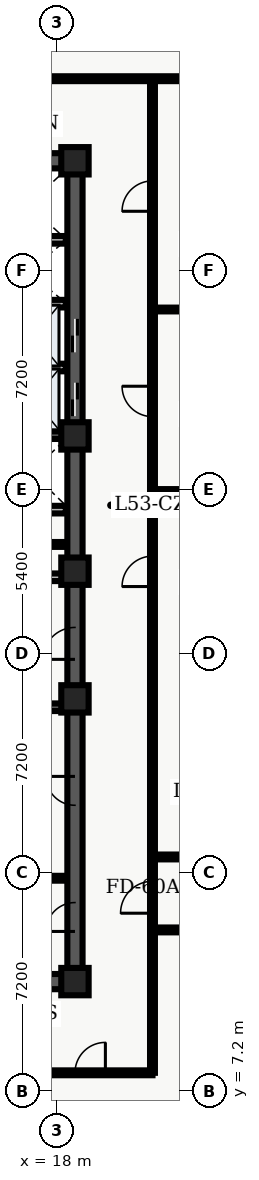
"""IFC4 building model, lengths in metres.
Left out: names, types, materials, properties, quantities, classifications, styles, units other than length and angle.
Written with IfcOpenShell. Run it as: python <this file> out.ifc"""

import sys

from ifc_helpers import new_model, entity, si_unit, converted_unit, direction, frame, origin_with_axes, origin_2d_with_axis, place, context, subcontext, project, spatial, polyline, rectangle, outline, extrude, element, fill, save


model = new_model("IFC4")
c1 = context("Model", 3, precision=1e-05, world=origin_with_axes(), true_north=direction((0.0, 1.0)))
c2 = subcontext(c1, "Body", "Model", "MODEL_VIEW")
j1 = project(units=[si_unit("LENGTHUNIT", "METRE"), converted_unit("PLANEANGLEUNIT", "DEGREE", entity("IfcPlaneAngleMeasure", 0.017), si_unit("PLANEANGLEUNIT", "RADIAN"), dimensions=[0, 0, 0, 0, 0, 0, 0])], contexts=[c1])
p1 = place(None, origin_with_axes())
s1 = spatial("IfcSite", under=j1, at=p1, CompositionType="ELEMENT")
p2 = place(p1, origin_with_axes())
s2 = spatial("IfcBuilding", under=s1, at=p2, CompositionType="ELEMENT")
p3 = place(p2, frame((0.0, 0.0, 216.0), z_axis=(0.0, 0.0, 1.0), x_axis=(1.0, 0.0, 0.0)))
s3 = spatial("IfcBuildingStorey", under=s2, at=p3, CompositionType="ELEMENT", Elevation=216.0)
p4 = place(p3, frame((11.4, 10.8, 0.0), z_axis=(0.0, 0.0, 1.0), x_axis=(1.0, 0.0, 0.0)))
e1 = element("IfcWall", 1, at=p4, inside=s3, PredefinedType="SHEAR", context=c2, shape_type="SweptSolid", body=[
    extrude(outline(polyline([(0.0, -0.25), (7.2, -0.25), (7.2, 0.25), (0.0, 0.25), (0.0, -0.25)])), origin_with_axes(), (0.0, 0.0, 1.0), 3.6),
])
p5 = place(p4, frame((2.625, 0.0, 0.0), z_axis=(0.0, 0.0, 1.0), x_axis=(1.0, 0.0, 0.0)))
e2 = element("IfcOpeningElement", 2, at=p5, cuts=e1, PredefinedType="OPENING", context=c2, shape_type="SweptSolid", body=[
    extrude(rectangle(XDim=1.05, YDim=0.52, at=origin_2d_with_axis()), origin_with_axes(), (0.0, 0.0, 1.0), 2.15),
])
p6 = place(p3, frame((11.4, 37.8, 0.0), z_axis=(0.0, 0.0, 1.0), x_axis=(1.0, 0.0, 0.0)))
e3 = element("IfcWall", 3, at=p6, inside=s3, PredefinedType="SHEAR", context=c2, shape_type="SweptSolid", body=[
    extrude(outline(polyline([(0.0, -0.25), (7.2, -0.25), (7.2, 0.25), (0.0, 0.25), (0.0, -0.25)])), origin_with_axes(), (0.0, 0.0, 1.0), 3.6),
])
p7 = place(p6, frame((2.625, 0.0, 0.0), z_axis=(0.0, 0.0, 1.0), x_axis=(1.0, 0.0, 0.0)))
e4 = element("IfcOpeningElement", 4, at=p7, cuts=e3, PredefinedType="OPENING", context=c2, shape_type="SweptSolid", body=[
    extrude(rectangle(XDim=1.05, YDim=0.52, at=origin_2d_with_axis()), origin_with_axes(), (0.0, 0.0, 1.0), 2.15),
])
p8 = place(p3, frame((18.6, 10.8, 0.0), z_axis=(0.0, 0.0, 1.0), x_axis=(0.0, 1.0, 0.0)))
e5 = element("IfcWall", 5, at=p8, inside=s3, PredefinedType="SHEAR", context=c2, shape_type="SweptSolid", body=[
    extrude(outline(polyline([(0.0, -0.25), (13.5, -0.25), (13.5, 0.25), (0.0, 0.25), (0.0, -0.25)])), origin_with_axes(), (0.0, 0.0, 1.0), 3.6),
])
p9 = place(p8, frame((11.125, 0.0, 0.0), z_axis=(0.0, 0.0, 1.0), x_axis=(1.0, 0.0, 0.0)))
e6 = element("IfcOpeningElement", 6, at=p9, cuts=e5, PredefinedType="OPENING", context=c2, shape_type="SweptSolid", body=[
    extrude(rectangle(XDim=1.05, YDim=0.52, at=origin_2d_with_axis()), origin_with_axes(), (0.0, 0.0, 1.0), 2.15),
])
p10 = place(p8, frame((2.125, 0.0, 0.0), z_axis=(0.0, 0.0, 1.0), x_axis=(1.0, 0.0, 0.0)))
e7 = element("IfcOpeningElement", 7, at=p10, cuts=e5, PredefinedType="OPENING", context=c2, shape_type="SweptSolid", body=[
    extrude(rectangle(XDim=0.95, YDim=0.52, at=origin_2d_with_axis()), origin_with_axes(), (0.0, 0.0, 1.0), 2.15),
])
p11 = place(p8, frame((6.275, 0.0, 0.0), z_axis=(0.0, 0.0, 1.0), x_axis=(1.0, 0.0, 0.0)))
e8 = element("IfcOpeningElement", 8, at=p11, cuts=e5, PredefinedType="OPENING", context=c2, shape_type="SweptSolid", body=[
    extrude(rectangle(XDim=0.95, YDim=0.52, at=origin_2d_with_axis()), origin_with_axes(), (0.0, 0.0, 1.0), 2.15),
])
p12 = place(p3, frame((18.6, 24.3, 0.0), z_axis=(0.0, 0.0, 1.0), x_axis=(0.0, 1.0, 0.0)))
e9 = element("IfcWall", 9, at=p12, inside=s3, PredefinedType="SHEAR", context=c2, shape_type="SweptSolid", body=[
    extrude(outline(polyline([(0.0, -0.25), (13.5, -0.25), (13.5, 0.25), (0.0, 0.25), (0.0, -0.25)])), origin_with_axes(), (0.0, 0.0, 1.0), 3.6),
])
p13 = place(p12, frame((5.65, 0.0, 0.0), z_axis=(0.0, 0.0, 1.0), x_axis=(1.0, 0.0, 0.0)))
e10 = element("IfcOpeningElement", 10, at=p13, cuts=e9, PredefinedType="OPENING", context=c2, shape_type="SweptSolid", body=[
    extrude(rectangle(XDim=1.1, YDim=0.52, at=origin_2d_with_axis()), origin_with_axes(), (0.0, 0.0, 1.0), 2.15),
])
p14 = place(p12, frame((7.75, 0.0, 0.0), z_axis=(0.0, 0.0, 1.0), x_axis=(1.0, 0.0, 0.0)))
e11 = element("IfcOpeningElement", 11, at=p14, cuts=e9, PredefinedType="OPENING", context=c2, shape_type="SweptSolid", body=[
    extrude(rectangle(XDim=1.1, YDim=0.52, at=origin_2d_with_axis()), origin_with_axes(), (0.0, 0.0, 1.0), 2.15),
])
for number, where, z_axis, x_axis in (
    (12, (11.65, 19.825, 0.0), (0.0, 0.0, 1.0), (1.0, 0.0, 0.0)),
    (13, (11.65, 28.775, 0.0), (0.0, 0.0, 1.0), (1.0, 0.0, 0.0)),
):
    element("IfcWall", number, at=place(p3, frame(where, z_axis=z_axis, x_axis=x_axis)), inside=s3, PredefinedType="SHEAR", context=c2, shape_type="SweptSolid", body=[
        extrude(outline(polyline([(0.0, -0.125), (6.7, -0.125), (6.7, 0.125), (0.0, 0.125), (0.0, -0.125)])), origin_with_axes(), (0.0, 0.0, 1.0), 3.6),
    ])
p15 = place(p3, frame((11.7, 24.1, 0.0), z_axis=(0.0, 0.0, 1.0), x_axis=(1.0, 0.0, 0.0)))
e14 = element("IfcWall", 14, at=p15, inside=s3, PredefinedType="SOLIDWALL", context=c2, shape_type="SweptSolid", body=[
    extrude(outline(polyline([(0.0, -0.125), (6.6, -0.125), (6.6, 0.125), (0.0, 0.125), (0.0, -0.125)])), origin_with_axes(), (0.0, 0.0, 1.0), 2.64),
])
p16 = place(p15, frame((3.75, 0.0, 0.0), z_axis=(0.0, 0.0, 1.0), x_axis=(1.0, 0.0, 0.0)))
e15 = element("IfcOpeningElement", 15, at=p16, cuts=e14, PredefinedType="OPENING", context=c2, shape_type="SweptSolid", body=[
    extrude(rectangle(XDim=0.9, YDim=0.27, at=origin_2d_with_axis()), origin_with_axes(), (0.0, 0.0, 1.0), 2.15),
])
p17 = place(p3, frame((11.7, 26.325, 0.0), z_axis=(0.0, 0.0, 1.0), x_axis=(1.0, 0.0, 0.0)))
e16 = element("IfcWall", 16, at=p17, inside=s3, PredefinedType="SOLIDWALL", context=c2, shape_type="SweptSolid", body=[
    extrude(outline(polyline([(0.0, -0.125), (6.6, -0.125), (6.6, 0.125), (0.0, 0.125), (0.0, -0.125)])), origin_with_axes(), (0.0, 0.0, 1.0), 2.64),
])
p18 = place(p17, frame((3.5, 0.0, 0.0), z_axis=(0.0, 0.0, 1.0), x_axis=(1.0, 0.0, 0.0)))
e17 = element("IfcOpeningElement", 17, at=p18, cuts=e16, PredefinedType="OPENING", context=c2, shape_type="SweptSolid", body=[
    extrude(rectangle(XDim=0.9, YDim=0.27, at=origin_2d_with_axis()), origin_with_axes(), (0.0, 0.0, 1.0), 2.15),
])
for number, where, z_axis, x_axis in (
    (18, (18.6, 10.8, 0.0), (0.0, 0.0, 1.0), (1.0, 0.0, 0.0)),
    (19, (18.6, 20.1, 0.0), (0.0, 0.0, 1.0), (1.0, 0.0, 0.0)),
    (20, (18.6, 24.3, 0.0), (0.0, 0.0, 1.0), (1.0, 0.0, 0.0)),
    (21, (18.6, 28.75, 0.0), (0.0, 0.0, 1.0), (1.0, 0.0, 0.0)),
    (22, (18.6, 37.8, 0.0), (0.0, 0.0, 1.0), (1.0, 0.0, 0.0)),
):
    element("IfcColumn", number, at=place(p3, frame(where, z_axis=z_axis, x_axis=x_axis)), inside=s3, PredefinedType="COLUMN", context=c2, shape_type="SweptSolid", body=[
        extrude(rectangle(XDim=0.9, YDim=0.9, at=origin_2d_with_axis()), origin_with_axes(), (0.0, 0.0, 1.0), 3.9),
    ])
p19 = place(p3, frame((14.62, 25.18, 0.0), z_axis=(0.0, 0.0, 1.0), x_axis=(1.0, 0.0, 0.0)))
e23 = element("IfcWall", 23, at=p19, inside=s3, PredefinedType="PARTITIONING", context=c2, shape_type="SweptSolid", body=[
    extrude(outline(polyline([(0.0, -0.08), (3.68, -0.08), (3.68, 0.08), (0.0, 0.08), (0.0, -0.08)])), origin_with_axes(), (0.0, 0.0, 1.0), 2.64),
])
p20 = place(p19, frame((1.95, 0.0, 0.0), z_axis=(0.0, 0.0, 1.0), x_axis=(1.0, 0.0, 0.0)))
e24 = element("IfcOpeningElement", 24, at=p20, cuts=e23, PredefinedType="OPENING", context=c2, shape_type="SweptSolid", body=[
    extrude(rectangle(XDim=0.9, YDim=0.18, at=origin_2d_with_axis()), origin_with_axes(), (0.0, 0.0, 1.0), 2.15),
])
p21 = place(p3, frame((15.84, 14.2, 0.0), z_axis=(0.0, 0.0, 1.0), x_axis=(1.0, 0.0, 0.0)))
e25 = element("IfcWall", 25, at=p21, inside=s3, PredefinedType="PARTITIONING", context=c2, shape_type="SweptSolid", body=[
    extrude(outline(polyline([(0.0, -0.08), (2.46, -0.08), (2.46, 0.08), (0.0, 0.08), (0.0, -0.08)])), origin_with_axes(), (0.0, 0.0, 1.0), 2.64),
])
for number, where, z_axis, x_axis in (
    (26, (15.84, 31.0, 0.0), (0.0, 0.0, 1.0), (1.0, 0.0, 0.0)),
    (27, (15.84, 33.1, 0.0), (0.0, 0.0, 1.0), (1.0, 0.0, 0.0)),
    (28, (15.84, 35.2, 0.0), (0.0, 0.0, 1.0), (1.0, 0.0, 0.0)),
):
    element("IfcWall", number, at=place(p3, frame(where, z_axis=z_axis, x_axis=x_axis)), inside=s3, PredefinedType="SOLIDWALL", context=c2, shape_type="SweptSolid", body=[
        extrude(outline(polyline([(0.0, -0.125), (2.46, -0.125), (2.46, 0.125), (0.0, 0.125), (0.0, -0.125)])), origin_with_axes(), (0.0, 0.0, 1.0), 2.64),
    ])
p22 = place(p3, frame((2.6, 7.8, 0.0), z_axis=(0.0, 0.0, 1.0), x_axis=(1.0, 0.0, 0.0)))
e29 = element("IfcWall", 29, at=p22, inside=s3, PredefinedType="PARTITIONING", context=c2, shape_type="SweptSolid", body=[
    extrude(outline(polyline([(0.0, -0.08), (18.55, -0.08), (18.55, 0.08), (0.0, 0.08), (0.0, -0.08)])), origin_with_axes(), (0.0, 0.0, 1.0), 2.64),
])
p23 = place(p22, frame((2.158, 0.0, 0.0), z_axis=(0.0, 0.0, 1.0), x_axis=(1.0, 0.0, 0.0)))
e30 = element("IfcOpeningElement", 30, at=p23, cuts=e29, PredefinedType="OPENING", context=c2, shape_type="SweptSolid", body=[
    extrude(rectangle(XDim=1.0, YDim=0.18, at=origin_2d_with_axis()), origin_with_axes(), (0.0, 0.0, 1.0), 2.15),
])
p24 = place(p22, frame((6.563, 0.0, 0.0), z_axis=(0.0, 0.0, 1.0), x_axis=(1.0, 0.0, 0.0)))
e31 = element("IfcOpeningElement", 31, at=p24, cuts=e29, PredefinedType="OPENING", context=c2, shape_type="SweptSolid", body=[
    extrude(rectangle(XDim=1.0, YDim=0.18, at=origin_2d_with_axis()), origin_with_axes(), (0.0, 0.0, 1.0), 2.15),
])
p25 = place(p22, frame((11.931, 0.0, 0.0), z_axis=(0.0, 0.0, 1.0), x_axis=(1.0, 0.0, 0.0)))
e32 = element("IfcOpeningElement", 32, at=p25, cuts=e29, PredefinedType="OPENING", context=c2, shape_type="SweptSolid", body=[
    extrude(rectangle(XDim=1.0, YDim=0.18, at=origin_2d_with_axis()), origin_with_axes(), (0.0, 0.0, 1.0), 2.15),
])
p26 = place(p22, frame((16.501, 0.0, 0.0), z_axis=(0.0, 0.0, 1.0), x_axis=(1.0, 0.0, 0.0)))
e33 = element("IfcOpeningElement", 33, at=p26, cuts=e29, PredefinedType="OPENING", context=c2, shape_type="SweptSolid", body=[
    extrude(rectangle(XDim=1.0, YDim=0.18, at=origin_2d_with_axis()), origin_with_axes(), (0.0, 0.0, 1.0), 2.15),
])
p27 = place(p3, frame((2.6, 40.5, 0.0), z_axis=(0.0, 0.0, 1.0), x_axis=(1.0, 0.0, 0.0)))
e34 = element("IfcWall", 34, at=p27, inside=s3, PredefinedType="PARTITIONING", context=c2, shape_type="SweptSolid", body=[
    extrude(outline(polyline([(0.0, -0.08), (29.465, -0.08), (29.465, 0.08), (0.0, 0.08), (0.0, -0.08)])), origin_with_axes(), (0.0, 0.0, 1.0), 2.64),
])
p28 = place(p27, frame((8.755, 0.0, 0.0), z_axis=(0.0, 0.0, 1.0), x_axis=(1.0, 0.0, 0.0)))
e35 = element("IfcOpeningElement", 35, at=p28, cuts=e34, PredefinedType="OPENING", context=c2, shape_type="SweptSolid", body=[
    extrude(rectangle(XDim=1.0, YDim=0.18, at=origin_2d_with_axis()), origin_with_axes(), (0.0, 0.0, 1.0), 2.15),
])
p29 = place(p3, frame((21.15, 7.8, 0.0), z_axis=(0.0, 0.0, 1.0), x_axis=(0.0, 1.0, 0.0)))
e36 = element("IfcWall", 36, at=p29, inside=s3, PredefinedType="PARTITIONING", context=c2, shape_type="SweptSolid", body=[
    extrude(outline(polyline([(0.0, -0.08), (32.7, -0.08), (32.7, 0.08), (0.0, 0.08), (0.0, -0.08)])), origin_with_axes(), (0.0, 0.0, 1.0), 2.64),
])
p30 = place(p29, frame((16.495, 0.0, 0.0), z_axis=(0.0, 0.0, 1.0), x_axis=(1.0, 0.0, 0.0)))
e37 = element("IfcOpeningElement", 37, at=p30, cuts=e36, PredefinedType="OPENING", context=c2, shape_type="SweptSolid", body=[
    extrude(rectangle(XDim=1.0, YDim=0.18, at=origin_2d_with_axis()), origin_with_axes(), (0.0, 0.0, 1.0), 2.15),
])
p31 = place(p29, frame((22.084, 0.0, 0.0), z_axis=(0.0, 0.0, 1.0), x_axis=(1.0, 0.0, 0.0)))
e38 = element("IfcOpeningElement", 38, at=p31, cuts=e36, PredefinedType="OPENING", context=c2, shape_type="SweptSolid", body=[
    extrude(rectangle(XDim=1.0, YDim=0.18, at=origin_2d_with_axis()), origin_with_axes(), (0.0, 0.0, 1.0), 2.15),
])
p32 = place(p29, frame((28.839, 0.0, 0.0), z_axis=(0.0, 0.0, 1.0), x_axis=(1.0, 0.0, 0.0)))
e39 = element("IfcOpeningElement", 39, at=p32, cuts=e36, PredefinedType="OPENING", context=c2, shape_type="SweptSolid", body=[
    extrude(rectangle(XDim=1.0, YDim=0.18, at=origin_2d_with_axis()), origin_with_axes(), (0.0, 0.0, 1.0), 2.15),
])
p33 = place(p29, frame((5.775, 0.0, 0.0), z_axis=(0.0, 0.0, 1.0), x_axis=(1.0, 0.0, 0.0)))
e40 = element("IfcOpeningElement", 40, at=p33, cuts=e36, PredefinedType="OPENING", context=c2, shape_type="SweptSolid", body=[
    extrude(rectangle(XDim=1.05, YDim=0.18, at=origin_2d_with_axis()), origin_with_axes(), (0.0, 0.0, 1.0), 2.15),
])
p34 = place(p3, frame((21.3, 26.86, 0.0), z_axis=(0.0, 0.0, 1.0), x_axis=(1.0, 0.0, 0.0)))
e41 = element("IfcWall", 41, at=p34, inside=s3, PredefinedType="PARTITIONING", context=c2, shape_type="SweptSolid", body=[
    extrude(outline(polyline([(0.0, -0.14), (10.765, -0.14), (10.765, 0.14), (0.0, 0.14), (0.0, -0.14)])), origin_with_axes(), (0.0, 0.0, 1.0), 2.64),
])
p35 = place(p3, frame((21.3, 32.908, 0.0), z_axis=(0.0, 0.0, 1.0), x_axis=(1.0, 0.0, 0.0)))
e42 = element("IfcWall", 42, at=p35, inside=s3, PredefinedType="PARTITIONING", context=c2, shape_type="SweptSolid", body=[
    extrude(outline(polyline([(0.0, -0.062), (10.765, -0.062), (10.765, 0.062), (0.0, 0.062), (0.0, -0.062)])), origin_with_axes(), (0.0, 0.0, 1.0), 2.64),
])
p36 = place(p3, frame((21.15, 12.5, 0.0), z_axis=(0.0, 0.0, 1.0), x_axis=(1.0, 0.0, 0.0)))
e43 = element("IfcWall", 43, at=p36, inside=s3, PredefinedType="PARTITIONING", context=c2, shape_type="SweptSolid", body=[
    extrude(outline(polyline([(0.0, -0.08), (15.2, -0.08), (15.2, 0.08), (0.0, 0.08), (0.0, -0.08)])), origin_with_axes(), (0.0, 0.0, 1.0), 2.64),
])
p37 = place(p36, frame((7.65, 0.0, 0.0), z_axis=(0.0, 0.0, 1.0), x_axis=(1.0, 0.0, 0.0)))
e44 = element("IfcOpeningElement", 44, at=p37, cuts=e43, PredefinedType="OPENING", context=c2, shape_type="SweptSolid", body=[
    extrude(rectangle(XDim=1.2, YDim=0.18, at=origin_2d_with_axis()), origin_with_axes(), (0.0, 0.0, 1.0), 2.2),
])
p38 = place(p3, frame((21.15, 14.9, 0.0), z_axis=(0.0, 0.0, 1.0), x_axis=(1.0, 0.0, 0.0)))
e45 = element("IfcWall", 45, at=p38, inside=s3, PredefinedType="PARTITIONING", context=c2, shape_type="SweptSolid", body=[
    extrude(outline(polyline([(0.0, -0.08), (15.2, -0.08), (15.2, 0.08), (0.0, 0.08), (0.0, -0.08)])), origin_with_axes(), (0.0, 0.0, 1.0), 2.64),
])
p39 = place(p38, frame((1.964, 0.0, 0.0), z_axis=(0.0, 0.0, 1.0), x_axis=(1.0, 0.0, 0.0)))
e46 = element("IfcOpeningElement", 46, at=p39, cuts=e45, PredefinedType="OPENING", context=c2, shape_type="SweptSolid", body=[
    extrude(rectangle(XDim=1.0, YDim=0.18, at=origin_2d_with_axis()), origin_with_axes(), (0.0, 0.0, 1.0), 2.15),
])
p40 = place(p38, frame((5.099, 0.0, 0.0), z_axis=(0.0, 0.0, 1.0), x_axis=(1.0, 0.0, 0.0)))
e47 = element("IfcOpeningElement", 47, at=p40, cuts=e45, PredefinedType="OPENING", context=c2, shape_type="SweptSolid", body=[
    extrude(rectangle(XDim=1.0, YDim=0.18, at=origin_2d_with_axis()), origin_with_axes(), (0.0, 0.0, 1.0), 2.15),
])
p41 = place(p38, frame((9.279, 0.0, 0.0), z_axis=(0.0, 0.0, 1.0), x_axis=(1.0, 0.0, 0.0)))
e48 = element("IfcOpeningElement", 48, at=p41, cuts=e45, PredefinedType="OPENING", context=c2, shape_type="SweptSolid", body=[
    extrude(rectangle(XDim=1.0, YDim=0.18, at=origin_2d_with_axis()), origin_with_axes(), (0.0, 0.0, 1.0), 2.15),
])
p42 = place(p38, frame((13.614, 0.0, 0.0), z_axis=(0.0, 0.0, 1.0), x_axis=(1.0, 0.0, 0.0)))
e49 = element("IfcOpeningElement", 49, at=p42, cuts=e45, PredefinedType="OPENING", context=c2, shape_type="SweptSolid", body=[
    extrude(rectangle(XDim=1.0, YDim=0.18, at=origin_2d_with_axis()), origin_with_axes(), (0.0, 0.0, 1.0), 2.15),
])
p43 = place(p12, frame((5.65, 0.0, 0.0), z_axis=(0.0, 0.0, 1.0), x_axis=(1.0, 0.0, 0.0)))
e50 = element("IfcDoor", 50, at=p43, inside=s3, OperationType="SLIDING_TO_LEFT", PredefinedType="DOOR", context=c2, shape_type="SweptSolid", body=[
    extrude(rectangle(XDim=1.1, YDim=0.09, at=origin_2d_with_axis()), origin_with_axes(), (0.0, 0.0, 1.0), 2.15),
])
fill(e10, e50)
p44 = place(p12, frame((7.75, 0.0, 0.0), z_axis=(0.0, 0.0, 1.0), x_axis=(1.0, 0.0, 0.0)))
e51 = element("IfcDoor", 51, at=p44, inside=s3, OperationType="SLIDING_TO_RIGHT", PredefinedType="DOOR", context=c2, shape_type="SweptSolid", body=[
    extrude(rectangle(XDim=1.1, YDim=0.09, at=origin_2d_with_axis()), origin_with_axes(), (0.0, 0.0, 1.0), 2.15),
])
fill(e11, e51)
p45 = place(p8, frame((11.125, 0.0, 0.0), z_axis=(0.0, 0.0, 1.0), x_axis=(1.0, 0.0, 0.0)))
e52 = element("IfcDoor", 52, at=p45, inside=s3, OperationType="SINGLE_SWING_LEFT", PredefinedType="DOOR", context=c2, shape_type="SweptSolid", body=[
    extrude(rectangle(XDim=1.05, YDim=0.09, at=origin_2d_with_axis()), origin_with_axes(), (0.0, 0.0, 1.0), 2.15),
])
fill(e6, e52)
p46 = place(p8, frame((2.125, 0.0, 0.0), z_axis=(0.0, 0.0, 1.0), x_axis=(1.0, 0.0, 0.0)))
e53 = element("IfcDoor", 53, at=p46, inside=s3, OperationType="SINGLE_SWING_LEFT", PredefinedType="DOOR", context=c2, shape_type="SweptSolid", body=[
    extrude(rectangle(XDim=0.95, YDim=0.09, at=origin_2d_with_axis()), origin_with_axes(), (0.0, 0.0, 1.0), 2.15),
])
fill(e7, e53)
p47 = place(p8, frame((6.275, 0.0, 0.0), z_axis=(0.0, 0.0, 1.0), x_axis=(1.0, 0.0, 0.0)))
e54 = element("IfcDoor", 54, at=p47, inside=s3, OperationType="SINGLE_SWING_RIGHT", PredefinedType="DOOR", context=c2, shape_type="SweptSolid", body=[
    extrude(rectangle(XDim=0.95, YDim=0.09, at=origin_2d_with_axis()), origin_with_axes(), (0.0, 0.0, 1.0), 2.15),
])
fill(e8, e54)
p48 = place(p22, frame((16.501, 0.0, 0.0), z_axis=(0.0, 0.0, 1.0), x_axis=(1.0, 0.0, 0.0)))
e55 = element("IfcDoor", 55, at=p48, inside=s3, OperationType="SINGLE_SWING_RIGHT", PredefinedType="DOOR", context=c2, shape_type="SweptSolid", body=[
    extrude(rectangle(XDim=1.0, YDim=0.09, at=origin_2d_with_axis()), origin_with_axes(), (0.0, 0.0, 1.0), 2.15),
])
fill(e33, e55)
p49 = place(p29, frame((16.495, 0.0, 0.0), z_axis=(0.0, 0.0, 1.0), x_axis=(1.0, 0.0, 0.0)))
e56 = element("IfcDoor", 56, at=p49, inside=s3, OperationType="SINGLE_SWING_LEFT", PredefinedType="DOOR", context=c2, shape_type="SweptSolid", body=[
    extrude(rectangle(XDim=1.0, YDim=0.09, at=origin_2d_with_axis()), origin_with_axes(), (0.0, 0.0, 1.0), 2.15),
])
fill(e37, e56)
p50 = place(p29, frame((22.084, 0.0, 0.0), z_axis=(0.0, 0.0, 1.0), x_axis=(1.0, 0.0, 0.0)))
e57 = element("IfcDoor", 57, at=p50, inside=s3, OperationType="SINGLE_SWING_RIGHT", PredefinedType="DOOR", context=c2, shape_type="SweptSolid", body=[
    extrude(rectangle(XDim=1.0, YDim=0.09, at=origin_2d_with_axis()), origin_with_axes(), (0.0, 0.0, 1.0), 2.15),
])
fill(e38, e57)
p51 = place(p29, frame((28.839, 0.0, 0.0), z_axis=(0.0, 0.0, 1.0), x_axis=(1.0, 0.0, 0.0)))
e58 = element("IfcDoor", 58, at=p51, inside=s3, OperationType="SINGLE_SWING_LEFT", PredefinedType="DOOR", context=c2, shape_type="SweptSolid", body=[
    extrude(rectangle(XDim=1.0, YDim=0.09, at=origin_2d_with_axis()), origin_with_axes(), (0.0, 0.0, 1.0), 2.15),
])
fill(e39, e58)
p52 = place(p29, frame((5.775, 0.0, 0.0), z_axis=(0.0, 0.0, 1.0), x_axis=(1.0, 0.0, 0.0)))
e59 = element("IfcDoor", 59, at=p52, inside=s3, OperationType="SINGLE_SWING_LEFT", PredefinedType="DOOR", context=c2, shape_type="SweptSolid", body=[
    extrude(rectangle(XDim=1.05, YDim=0.09, at=origin_2d_with_axis()), origin_with_axes(), (0.0, 0.0, 1.0), 2.15),
])
fill(e40, e59)
save(model, sys.argv[1])
